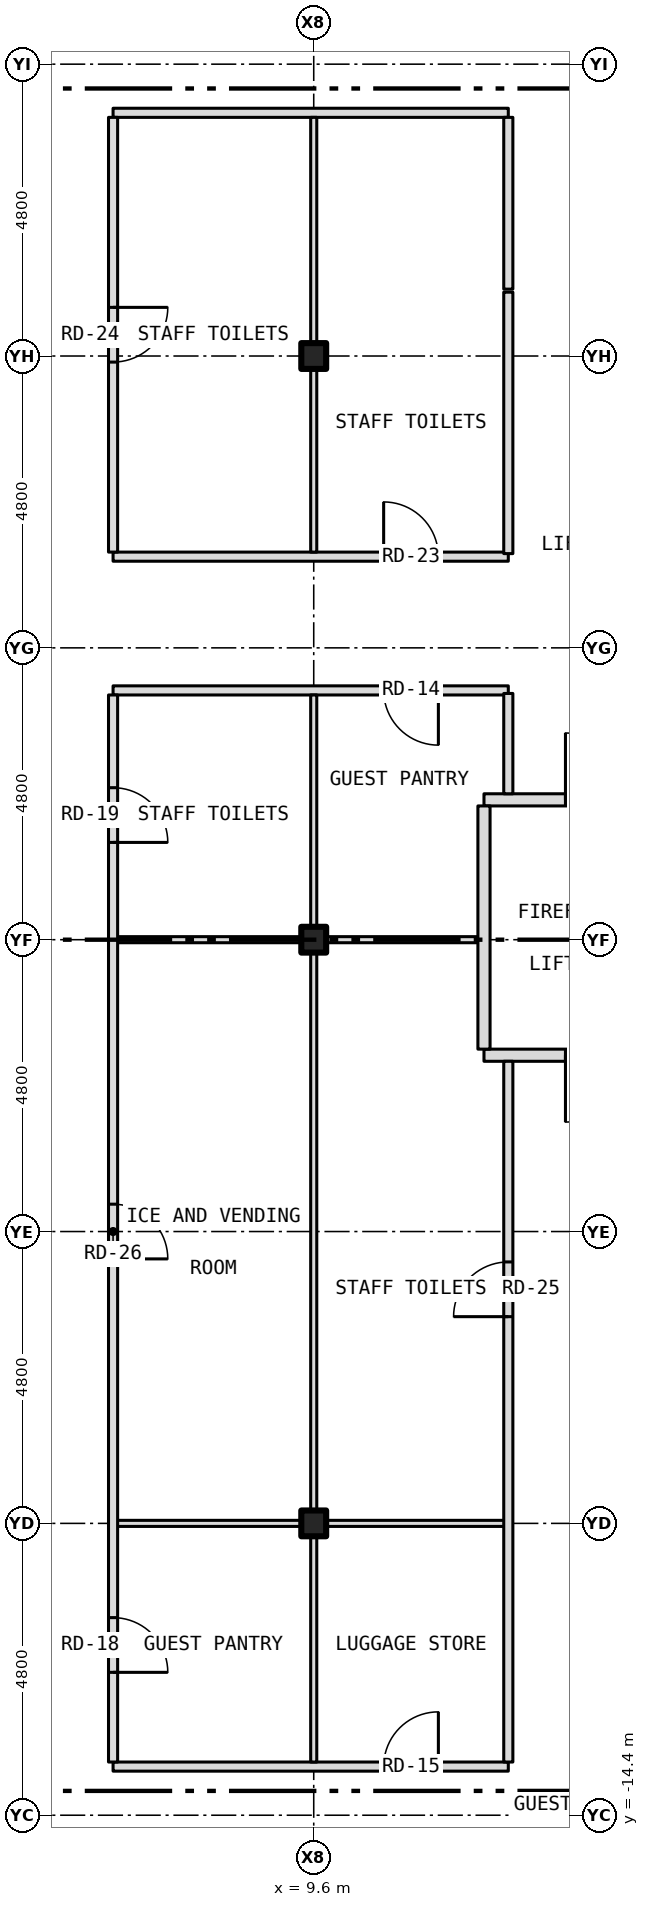
"""IFC4 building model, lengths in metres.
Left out: names, types, materials, properties, quantities, classifications, styles, units other than length and angle.
Written with IfcOpenShell. Run it as: python <this file> out.ifc"""

import sys

from ifc_helpers import new_model, si_unit, direction, frame, frame_2d, origin, origin_2d, place, context, subcontext, project, spatial, rectangle, i_section, extrude, element, fill, save


model = new_model("IFC4")
c1 = context("Model", 3, precision=1e-05, world=origin(), true_north=direction((0.0, 1.0)))
c2 = subcontext(c1, "Body", "Model", "MODEL_VIEW")
j1 = project(units=[si_unit("LENGTHUNIT", "METRE"), si_unit("PLANEANGLEUNIT", "RADIAN")], contexts=[c1])
p1 = place(None, origin())
s1 = spatial("IfcSite", under=j1, at=p1, CompositionType="ELEMENT")
p2 = place(p1, origin())
s2 = spatial("IfcBuilding", under=s1, at=p2, CompositionType="ELEMENT")
p3 = place(p2, frame((0.0, 0.0, 56.5)))
s3 = spatial("IfcBuildingStorey", under=s2, at=p3, CompositionType="ELEMENT", Elevation=56.5)
for number, where, z_axis, x_axis in (
    (1, (9.6, -9.6, -0.15), (0.0, 0.0, 1.0), (1.0, 0.0, 0.0)),
    (2, (9.6, 0.0, -0.15), (0.0, 0.0, 1.0), (1.0, 0.0, 0.0)),
    (3, (9.6, 9.6, -0.15), (0.0, 0.0, 1.0), (1.0, 0.0, 0.0)),
):
    element("IfcColumn", number, at=place(p3, frame(where, z_axis=z_axis, x_axis=x_axis)), inside=s3, PredefinedType="COLUMN", context=c2, shape_type="SweptSolid", body=[
        extrude(i_section(OverallWidth=0.409, OverallDepth=0.424, WebThickness=0.033, FlangeThickness=0.052, at=origin_2d()), origin(), (0.0, 0.0, 1.0), 3.5),
    ])
p4 = place(p3, frame((6.3, -13.6, 0.0), z_axis=(0.0, 0.0, 1.0), x_axis=(1.0, 0.0, 0.0)))
e4 = element("IfcWall", 4, at=p4, inside=s3, PredefinedType="PARTITIONING", context=c2, shape_type="SweptSolid", body=[
    extrude(rectangle(XDim=6.5, YDim=0.15, at=frame_2d((3.25, 0.0))), origin(), (0.0, 0.0, 1.0), 3.35),
])
p5 = place(p4, frame((4.45, 0.0, 0.0)))
e5 = element("IfcOpeningElement", 5, at=p5, cuts=e4, PredefinedType="OPENING", context=c2, shape_type="SweptSolid", body=[
    extrude(rectangle(XDim=0.9, YDim=2.1, at=frame_2d((0.45, 1.05))), frame((0.0, 0.087, 0.0), z_axis=(0.0, -1.0, 0.0), x_axis=(1.0, 0.0, 0.0)), (0.0, 0.0, 1.0), 0.174),
])
p6 = place(p3, frame((6.3, -9.6, 0.0), z_axis=(0.0, 0.0, 1.0), x_axis=(1.0, 0.0, 0.0)))
e6 = element("IfcWall", 6, at=p6, inside=s3, PredefinedType="PARTITIONING", context=c2, shape_type="SweptSolid", body=[
    extrude(rectangle(XDim=3.096, YDim=0.1, at=frame_2d((1.548, 0.0))), origin(), (0.0, 0.0, 1.0), 2.728),
])
p7 = place(p3, frame((9.396, -9.6, 0.0), z_axis=(0.0, 0.0, 1.0), x_axis=(1.0, 0.0, 0.0)))
e7 = element("IfcWall", 7, at=p7, inside=s3, PredefinedType="PARTITIONING", context=c2, shape_type="SweptSolid", body=[
    extrude(rectangle(XDim=0.408, YDim=0.1, at=frame_2d((0.204, 0.0))), origin(), (0.0, 0.0, 1.0), 3.35),
])
p8 = place(p3, frame((9.804, -9.6, 0.0), z_axis=(0.0, 0.0, 1.0), x_axis=(1.0, 0.0, 0.0)))
e8 = element("IfcWall", 8, at=p8, inside=s3, PredefinedType="PARTITIONING", context=c2, shape_type="SweptSolid", body=[
    extrude(rectangle(XDim=2.996, YDim=0.1, at=frame_2d((1.498, 0.0))), origin(), (0.0, 0.0, 1.0), 2.728),
])
p9 = place(p3, frame((12.4, -1.9, 0.0), z_axis=(0.0, 0.0, 1.0), x_axis=(1.0, 0.0, 0.0)))
e9 = element("IfcWall", 9, at=p9, inside=s3, PredefinedType="PARTITIONING", context=c2, shape_type="SweptSolid", body=[
    extrude(rectangle(XDim=3.28, YDim=0.2, at=frame_2d((1.64, 0.0))), origin(), (0.0, 0.0, 1.0), 3.35),
])
p10 = place(p9, frame((1.34, 0.0, 0.0)))
e10 = element("IfcOpeningElement", 10, at=p10, cuts=e9, PredefinedType="OPENING", context=c2, shape_type="SweptSolid", body=[
    extrude(rectangle(XDim=1.1, YDim=2.1, at=frame_2d((0.55, 1.05))), frame((0.0, 0.112, 0.0), z_axis=(0.0, -1.0, 0.0), x_axis=(1.0, 0.0, 0.0)), (0.0, 0.0, 1.0), 0.224),
])
p11 = place(p3, frame((6.3, 0.0, 0.0), z_axis=(0.0, 0.0, 1.0), x_axis=(1.0, 0.0, 0.0)))
e11 = element("IfcWall", 11, at=p11, inside=s3, PredefinedType="PARTITIONING", context=c2, shape_type="SweptSolid", body=[
    extrude(rectangle(XDim=3.096, YDim=0.1, at=frame_2d((1.548, 0.0))), origin(), (0.0, 0.0, 1.0), 2.728),
])
p12 = place(p3, frame((9.396, 0.0, 0.0), z_axis=(0.0, 0.0, 1.0), x_axis=(1.0, 0.0, 0.0)))
e12 = element("IfcWall", 12, at=p12, inside=s3, PredefinedType="PARTITIONING", context=c2, shape_type="SweptSolid", body=[
    extrude(rectangle(XDim=0.408, YDim=0.1, at=frame_2d((0.204, 0.0))), origin(), (0.0, 0.0, 1.0), 3.35),
])
p13 = place(p3, frame((9.804, 0.0, 0.0), z_axis=(0.0, 0.0, 1.0), x_axis=(1.0, 0.0, 0.0)))
e13 = element("IfcWall", 13, at=p13, inside=s3, PredefinedType="PARTITIONING", context=c2, shape_type="SweptSolid", body=[
    extrude(rectangle(XDim=2.596, YDim=0.1, at=frame_2d((1.298, 0.0))), origin(), (0.0, 0.0, 1.0), 2.728),
])
p14 = place(p3, frame((12.4, 2.3, 0.0), z_axis=(0.0, 0.0, 1.0), x_axis=(1.0, 0.0, 0.0)))
e14 = element("IfcWall", 14, at=p14, inside=s3, PredefinedType="PARTITIONING", context=c2, shape_type="SweptSolid", body=[
    extrude(rectangle(XDim=3.28, YDim=0.2, at=frame_2d((1.64, 0.0))), origin(), (0.0, 0.0, 1.0), 3.35),
])
p15 = place(p14, frame((1.34, 0.0, 0.0)))
e15 = element("IfcOpeningElement", 15, at=p15, cuts=e14, PredefinedType="OPENING", context=c2, shape_type="SweptSolid", body=[
    extrude(rectangle(XDim=1.1, YDim=2.1, at=frame_2d((0.55, 1.05))), frame((0.0, 0.112, 0.0), z_axis=(0.0, -1.0, 0.0), x_axis=(1.0, 0.0, 0.0)), (0.0, 0.0, 1.0), 0.224),
])
p16 = place(p3, frame((6.3, 4.1, 0.0), z_axis=(0.0, 0.0, 1.0), x_axis=(1.0, 0.0, 0.0)))
e16 = element("IfcWall", 16, at=p16, inside=s3, PredefinedType="PARTITIONING", context=c2, shape_type="SweptSolid", body=[
    extrude(rectangle(XDim=6.5, YDim=0.15, at=frame_2d((3.25, 0.0))), origin(), (0.0, 0.0, 1.0), 3.35),
])
p17 = place(p16, frame((4.45, 0.0, 0.0)))
e17 = element("IfcOpeningElement", 17, at=p17, cuts=e16, PredefinedType="OPENING", context=c2, shape_type="SweptSolid", body=[
    extrude(rectangle(XDim=0.9, YDim=2.1, at=frame_2d((0.45, 1.05))), frame((0.0, 0.087, 0.0), z_axis=(0.0, -1.0, 0.0), x_axis=(1.0, 0.0, 0.0)), (0.0, 0.0, 1.0), 0.174),
])
p18 = place(p3, frame((6.3, 6.3, 0.0), z_axis=(0.0, 0.0, 1.0), x_axis=(1.0, 0.0, 0.0)))
e18 = element("IfcWall", 18, at=p18, inside=s3, PredefinedType="PARTITIONING", context=c2, shape_type="SweptSolid", body=[
    extrude(rectangle(XDim=6.5, YDim=0.15, at=frame_2d((3.25, 0.0))), origin(), (0.0, 0.0, 1.0), 3.35),
])
p19 = place(p18, frame((4.45, 0.0, 0.0)))
e19 = element("IfcOpeningElement", 19, at=p19, cuts=e18, PredefinedType="OPENING", context=c2, shape_type="SweptSolid", body=[
    extrude(rectangle(XDim=0.9, YDim=2.1, at=frame_2d((0.45, 1.05))), frame((0.0, 0.087, 0.0), z_axis=(0.0, -1.0, 0.0), x_axis=(1.0, 0.0, 0.0)), (0.0, 0.0, 1.0), 0.174),
])
p20 = place(p3, frame((6.3, 13.6, 0.0), z_axis=(0.0, 0.0, 1.0), x_axis=(1.0, 0.0, 0.0)))
e20 = element("IfcWall", 20, at=p20, inside=s3, PredefinedType="PARTITIONING", context=c2, shape_type="SweptSolid", body=[
    extrude(rectangle(XDim=6.5, YDim=0.15, at=frame_2d((3.25, 0.0))), origin(), (0.0, 0.0, 1.0), 3.35),
])
p21 = place(p3, frame((6.3, -13.525, 0.0), z_axis=(0.0, 0.0, 1.0), x_axis=(0.0, 1.0, 0.0)))
e21 = element("IfcWall", 21, at=p21, inside=s3, PredefinedType="PARTITIONING", context=c2, shape_type="SweptSolid", body=[
    extrude(rectangle(XDim=17.55, YDim=0.15, at=frame_2d((8.775, 0.0))), origin(), (0.0, 0.0, 1.0), 3.35),
])
p22 = place(p21, frame((1.475, 0.0, 0.0)))
e22 = element("IfcOpeningElement", 22, at=p22, cuts=e21, PredefinedType="OPENING", context=c2, shape_type="SweptSolid", body=[
    extrude(rectangle(XDim=0.9, YDim=2.1, at=frame_2d((0.45, 1.05))), frame((0.0, 0.087, 0.0), z_axis=(0.0, -1.0, 0.0), x_axis=(1.0, 0.0, 0.0)), (0.0, 0.0, 1.0), 0.174),
])
p23 = place(p21, frame((15.125, 0.0, 0.0)))
e23 = element("IfcOpeningElement", 23, at=p23, cuts=e21, PredefinedType="OPENING", context=c2, shape_type="SweptSolid", body=[
    extrude(rectangle(XDim=0.9, YDim=2.1, at=frame_2d((0.45, 1.05))), frame((0.0, 0.087, 0.0), z_axis=(0.0, -1.0, 0.0), x_axis=(1.0, 0.0, 0.0)), (0.0, 0.0, 1.0), 0.174),
])
p24 = place(p21, frame((8.275, 0.0, 0.0)))
e24 = element("IfcOpeningElement", 24, at=p24, cuts=e21, PredefinedType="OPENING", context=c2, shape_type="SweptSolid", body=[
    extrude(rectangle(XDim=0.9, YDim=2.1, at=frame_2d((0.45, 1.05))), frame((0.0, 0.087, 0.0), z_axis=(0.0, -1.0, 0.0), x_axis=(1.0, 0.0, 0.0)), (0.0, 0.0, 1.0), 0.174),
])
p25 = place(p3, frame((6.3, 6.375, 0.0), z_axis=(0.0, 0.0, 1.0), x_axis=(0.0, 1.0, 0.0)))
e25 = element("IfcWall", 25, at=p25, inside=s3, PredefinedType="PARTITIONING", context=c2, shape_type="SweptSolid", body=[
    extrude(rectangle(XDim=7.15, YDim=0.15, at=frame_2d((3.575, 0.0))), origin(), (0.0, 0.0, 1.0), 3.35),
])
p26 = place(p25, frame((3.125, 0.0, 0.0)))
e26 = element("IfcOpeningElement", 26, at=p26, cuts=e25, PredefinedType="OPENING", context=c2, shape_type="SweptSolid", body=[
    extrude(rectangle(XDim=0.9, YDim=2.1, at=frame_2d((0.45, 1.05))), frame((0.0, 0.087, 0.0), z_axis=(0.0, -1.0, 0.0), x_axis=(1.0, 0.0, 0.0)), (0.0, 0.0, 1.0), 0.174),
])
p27 = place(p3, frame((9.6, -13.525, 0.0), z_axis=(0.0, 0.0, 1.0), x_axis=(0.0, 1.0, 0.0)))
e27 = element("IfcWall", 27, at=p27, inside=s3, PredefinedType="PARTITIONING", context=c2, shape_type="SweptSolid", body=[
    extrude(rectangle(XDim=3.875, YDim=0.1, at=frame_2d((1.938, 0.0))), origin(), (0.0, 0.0, 1.0), 2.728),
])
p28 = place(p3, frame((9.6, -9.55, 0.0), z_axis=(0.0, 0.0, 1.0), x_axis=(0.0, 1.0, 0.0)))
e28 = element("IfcWall", 28, at=p28, inside=s3, PredefinedType="PARTITIONING", context=c2, shape_type="SweptSolid", body=[
    extrude(rectangle(XDim=9.5, YDim=0.1, at=frame_2d((4.75, 0.0))), origin(), (0.0, 0.0, 1.0), 2.728),
])
p29 = place(p3, frame((9.6, 0.05, 0.0), z_axis=(0.0, 0.0, 1.0), x_axis=(0.0, 1.0, 0.0)))
e29 = element("IfcWall", 29, at=p29, inside=s3, PredefinedType="PARTITIONING", context=c2, shape_type="SweptSolid", body=[
    extrude(rectangle(XDim=3.975, YDim=0.1, at=frame_2d((1.987, 0.0))), origin(), (0.0, 0.0, 1.0), 2.728),
])
p30 = place(p3, frame((9.6, 6.375, 0.0), z_axis=(0.0, 0.0, 1.0), x_axis=(0.0, 1.0, 0.0)))
e30 = element("IfcWall", 30, at=p30, inside=s3, PredefinedType="PARTITIONING", context=c2, shape_type="SweptSolid", body=[
    extrude(rectangle(XDim=3.021, YDim=0.1, at=frame_2d((1.51, 0.0))), origin(), (0.0, 0.0, 1.0), 2.728),
])
p31 = place(p3, frame((9.6, 9.396, 0.0), z_axis=(0.0, 0.0, 1.0), x_axis=(0.0, 1.0, 0.0)))
e31 = element("IfcWall", 31, at=p31, inside=s3, PredefinedType="PARTITIONING", context=c2, shape_type="SweptSolid", body=[
    extrude(rectangle(XDim=0.408, YDim=0.1, at=frame_2d((0.204, 0.0))), origin(), (0.0, 0.0, 1.0), 3.35),
])
p32 = place(p3, frame((9.6, 9.804, 0.0), z_axis=(0.0, 0.0, 1.0), x_axis=(0.0, 1.0, 0.0)))
e32 = element("IfcWall", 32, at=p32, inside=s3, PredefinedType="PARTITIONING", context=c2, shape_type="SweptSolid", body=[
    extrude(rectangle(XDim=3.721, YDim=0.1, at=frame_2d((1.86, 0.0))), origin(), (0.0, 0.0, 1.0), 2.728),
])
p33 = place(p3, frame((12.4, -1.8, 0.0), z_axis=(0.0, 0.0, 1.0), x_axis=(0.0, 1.0, 0.0)))
e33 = element("IfcWall", 33, at=p33, inside=s3, PredefinedType="PARTITIONING", context=c2, shape_type="SweptSolid", body=[
    extrude(rectangle(XDim=4.0, YDim=0.2, at=frame_2d((2.0, 0.0))), origin(), (0.0, 0.0, 1.0), 3.35),
])
p34 = place(p3, frame((12.8, -13.525, 0.0), z_axis=(0.0, 0.0, 1.0), x_axis=(0.0, 1.0, 0.0)))
e34 = element("IfcWall", 34, at=p34, inside=s3, PredefinedType="PARTITIONING", context=c2, shape_type="SweptSolid", body=[
    extrude(rectangle(XDim=11.525, YDim=0.15, at=frame_2d((5.762, 0.0))), origin(), (0.0, 0.0, 1.0), 3.35),
])
p35 = place(p34, frame((7.325, 0.0, 0.0)))
e35 = element("IfcOpeningElement", 35, at=p35, cuts=e34, PredefinedType="OPENING", context=c2, shape_type="SweptSolid", body=[
    extrude(rectangle(XDim=0.9, YDim=2.1, at=frame_2d((0.45, 1.05))), frame((0.0, 0.087, 0.0), z_axis=(0.0, -1.0, 0.0), x_axis=(1.0, 0.0, 0.0)), (0.0, 0.0, 1.0), 0.174),
])
p36 = place(p3, frame((12.8, 2.4, 0.0), z_axis=(0.0, 0.0, 1.0), x_axis=(0.0, 1.0, 0.0)))
e36 = element("IfcWall", 36, at=p36, inside=s3, PredefinedType="PARTITIONING", context=c2, shape_type="SweptSolid", body=[
    extrude(rectangle(XDim=1.65, YDim=0.15, at=frame_2d((0.825, 0.0))), origin(), (0.0, 0.0, 1.0), 3.35),
])
p37 = place(p3, frame((12.8, 6.35, 0.0), z_axis=(0.0, 0.0, 1.0), x_axis=(0.0, 1.0, 0.0)))
e37 = element("IfcWall", 37, at=p37, inside=s3, PredefinedType="PARTITIONING", context=c2, shape_type="SweptSolid", body=[
    extrude(rectangle(XDim=4.3, YDim=0.15, at=frame_2d((2.15, 0.0))), origin(), (0.0, 0.0, 1.0), 3.35),
])
p38 = place(p3, frame((12.8, 10.7, 0.0), z_axis=(0.0, 0.0, 1.0), x_axis=(0.0, 1.0, 0.0)))
e38 = element("IfcWall", 38, at=p38, inside=s3, PredefinedType="PARTITIONING", context=c2, shape_type="SweptSolid", body=[
    extrude(rectangle(XDim=2.825, YDim=0.15, at=frame_2d((1.413, 0.0))), origin(), (0.0, 0.0, 1.0), 3.35),
])
p39 = place(p15, origin())
e39 = element("IfcDoor", 39, at=p39, inside=s3, OperationType="SINGLE_SWING_LEFT", PredefinedType="DOOR", context=c2, shape_type="SweptSolid", body=[
    extrude(rectangle(XDim=1.1, YDim=2.1, at=frame_2d((0.55, 1.05))), frame((0.0, 0.025, 0.0), z_axis=(0.0, -1.0, 0.0), x_axis=(1.0, 0.0, 0.0)), (0.0, 0.0, 1.0), 0.05),
])
fill(e15, e39)
p40 = place(p10, origin())
e40 = element("IfcDoor", 40, at=p40, inside=s3, OperationType="SINGLE_SWING_LEFT", PredefinedType="DOOR", context=c2, shape_type="SweptSolid", body=[
    extrude(rectangle(XDim=1.1, YDim=2.1, at=frame_2d((0.55, 1.05))), frame((0.0, 0.025, 0.0), z_axis=(0.0, -1.0, 0.0), x_axis=(1.0, 0.0, 0.0)), (0.0, 0.0, 1.0), 0.05),
])
fill(e10, e40)
p41 = place(p17, origin())
e41 = element("IfcDoor", 41, at=p41, inside=s3, OperationType="SINGLE_SWING_RIGHT", PredefinedType="DOOR", context=c2, shape_type="SweptSolid", body=[
    extrude(rectangle(XDim=0.9, YDim=2.1, at=frame_2d((0.45, 1.05))), frame((0.0, 0.025, 0.0), z_axis=(0.0, -1.0, 0.0), x_axis=(1.0, 0.0, 0.0)), (0.0, 0.0, 1.0), 0.05),
])
fill(e17, e41)
p42 = place(p5, origin())
e42 = element("IfcDoor", 42, at=p42, inside=s3, OperationType="SINGLE_SWING_RIGHT", PredefinedType="DOOR", context=c2, shape_type="SweptSolid", body=[
    extrude(rectangle(XDim=0.9, YDim=2.1, at=frame_2d((0.45, 1.05))), frame((0.0, 0.025, 0.0), z_axis=(0.0, -1.0, 0.0), x_axis=(1.0, 0.0, 0.0)), (0.0, 0.0, 1.0), 0.05),
])
fill(e5, e42)
p43 = place(p22, origin())
e43 = element("IfcDoor", 43, at=p43, inside=s3, OperationType="SINGLE_SWING_LEFT", PredefinedType="DOOR", context=c2, shape_type="SweptSolid", body=[
    extrude(rectangle(XDim=0.9, YDim=2.1, at=frame_2d((0.45, 1.05))), frame((0.0, 0.025, 0.0), z_axis=(0.0, -1.0, 0.0), x_axis=(1.0, 0.0, 0.0)), (0.0, 0.0, 1.0), 0.05),
])
fill(e22, e43)
p44 = place(p23, origin())
e44 = element("IfcDoor", 44, at=p44, inside=s3, OperationType="SINGLE_SWING_LEFT", PredefinedType="DOOR", context=c2, shape_type="SweptSolid", body=[
    extrude(rectangle(XDim=0.9, YDim=2.1, at=frame_2d((0.45, 1.05))), frame((0.0, 0.025, 0.0), z_axis=(0.0, -1.0, 0.0), x_axis=(1.0, 0.0, 0.0)), (0.0, 0.0, 1.0), 0.05),
])
fill(e23, e44)
p45 = place(p19, origin())
e45 = element("IfcDoor", 45, at=p45, inside=s3, OperationType="SINGLE_SWING_LEFT", PredefinedType="DOOR", context=c2, shape_type="SweptSolid", body=[
    extrude(rectangle(XDim=0.9, YDim=2.1, at=frame_2d((0.45, 1.05))), frame((0.0, 0.025, 0.0), z_axis=(0.0, -1.0, 0.0), x_axis=(1.0, 0.0, 0.0)), (0.0, 0.0, 1.0), 0.05),
])
fill(e19, e45)
p46 = place(p26, origin())
e46 = element("IfcDoor", 46, at=p46, inside=s3, OperationType="SINGLE_SWING_RIGHT", PredefinedType="DOOR", context=c2, shape_type="SweptSolid", body=[
    extrude(rectangle(XDim=0.9, YDim=2.1, at=frame_2d((0.45, 1.05))), frame((0.0, 0.025, 0.0), z_axis=(0.0, -1.0, 0.0), x_axis=(1.0, 0.0, 0.0)), (0.0, 0.0, 1.0), 0.05),
])
fill(e26, e46)
p47 = place(p35, origin())
e47 = element("IfcDoor", 47, at=p47, inside=s3, OperationType="SINGLE_SWING_LEFT", PredefinedType="DOOR", context=c2, shape_type="SweptSolid", body=[
    extrude(rectangle(XDim=0.9, YDim=2.1, at=frame_2d((0.45, 1.05))), frame((0.0, 0.025, 0.0), z_axis=(0.0, -1.0, 0.0), x_axis=(1.0, 0.0, 0.0)), (0.0, 0.0, 1.0), 0.05),
])
fill(e35, e47)
p48 = place(p24, origin())
e48 = element("IfcDoor", 48, at=p48, inside=s3, OperationType="SINGLE_SWING_LEFT", PredefinedType="DOOR", context=c2, shape_type="SweptSolid", body=[
    extrude(rectangle(XDim=0.9, YDim=2.1, at=frame_2d((0.45, 1.05))), frame((0.0, 0.025, 0.0), z_axis=(0.0, -1.0, 0.0), x_axis=(1.0, 0.0, 0.0)), (0.0, 0.0, 1.0), 0.05),
])
fill(e24, e48)
save(model, sys.argv[1])
